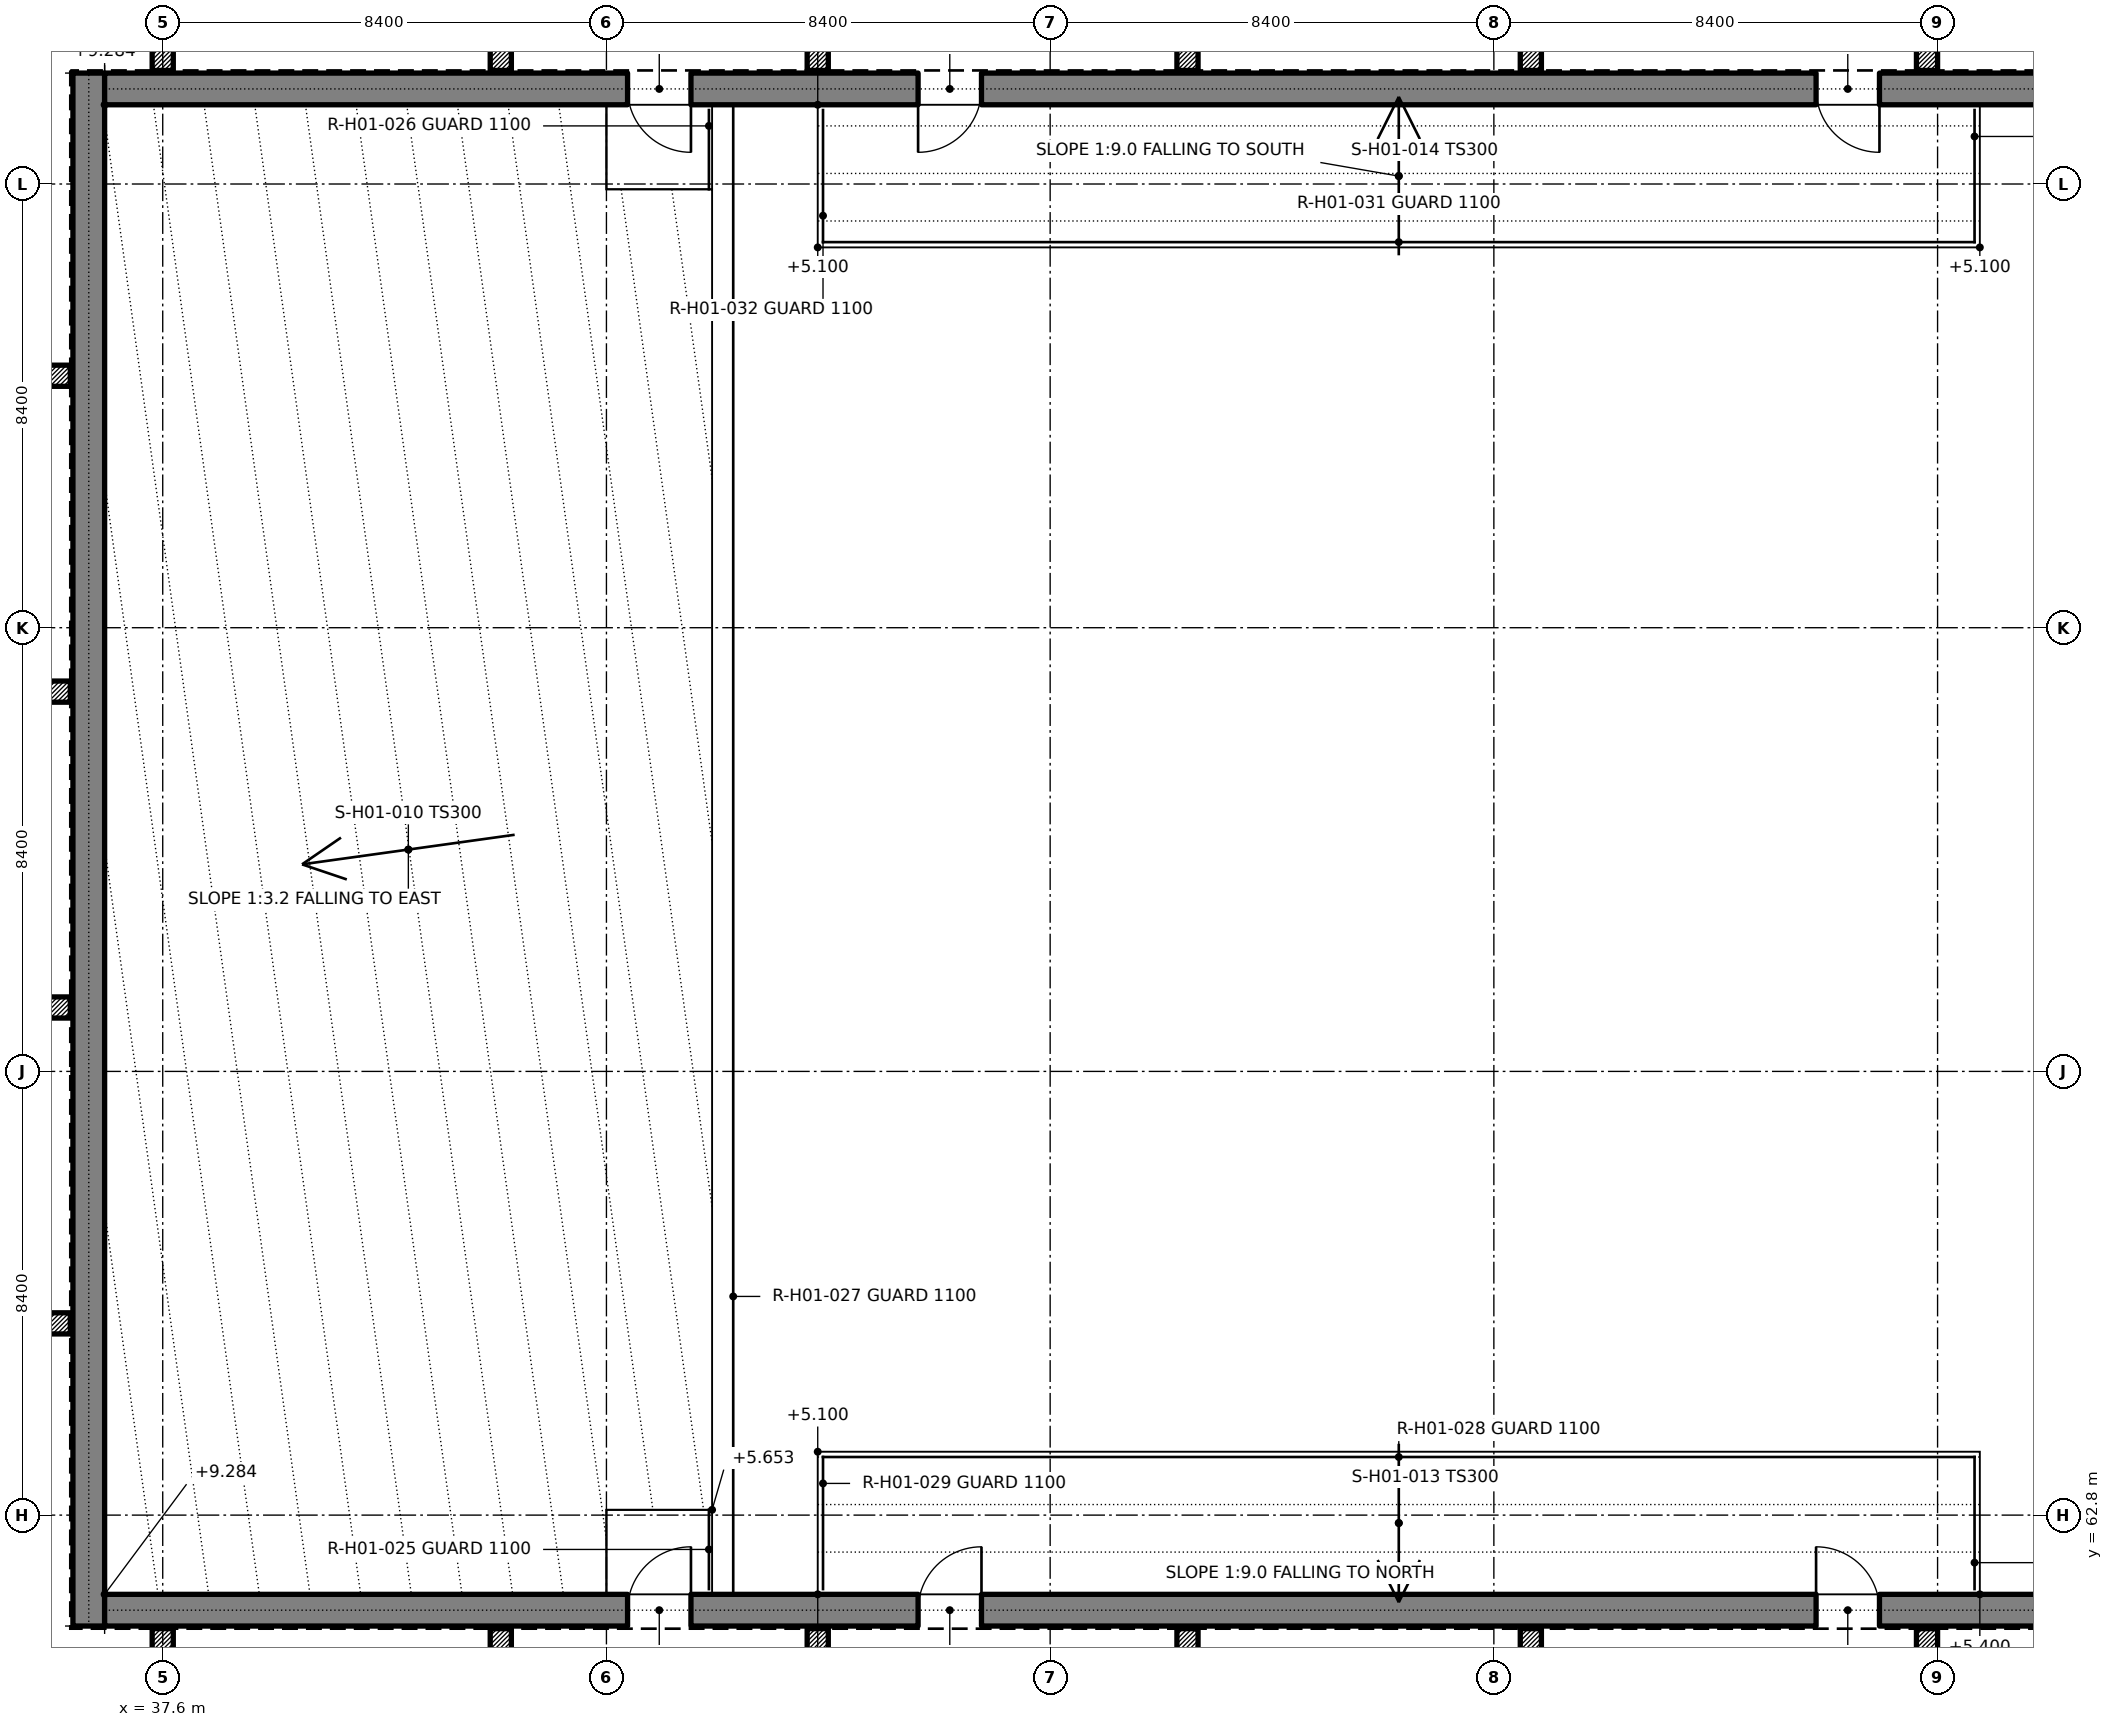
"""IFC4 building model, lengths in metres.
Left out: names, types, materials, properties, quantities, classifications, styles, units other than length and angle.
Written with IfcOpenShell. Run it as: python <this file> out.ifc"""

import sys

from ifc_helpers import new_model, si_unit, direction, frame, frame_2d, origin, origin_2d, place, context, subcontext, project, spatial, rectangle, extrude, element, fill, save


model = new_model("IFC4")
c1 = context("Model", 3, precision=1e-05, world=origin(), true_north=direction((0.0, 1.0)))
c2 = subcontext(c1, "Body", "Model", "MODEL_VIEW")
j1 = project(units=[si_unit("LENGTHUNIT", "METRE"), si_unit("PLANEANGLEUNIT", "RADIAN")], contexts=[c1])
p1 = place(None, origin())
s1 = spatial("IfcSite", under=j1, at=p1, CompositionType="ELEMENT")
p2 = place(p1, origin())
s2 = spatial("IfcBuilding", under=s1, at=p2, CompositionType="ELEMENT")
p3 = place(p2, frame((0.0, 0.0, 5.4)))
s3 = spatial("IfcBuildingStorey", under=s2, at=p3, CompositionType="ELEMENT", Elevation=5.4)
p4 = place(p3, frame((36.2, 60.7, 0.0), z_axis=(0.0, 0.0, 1.0), x_axis=(0.0, 1.0, 0.0)))
e1 = element("IfcWall", 1, at=p4, inside=s3, PredefinedType="SOLIDWALL", context=c2, shape_type="SweptSolid", body=[
    extrude(rectangle(XDim=29.4, YDim=0.6, at=frame_2d((14.7, 0.0))), origin(), (0.0, 0.0, 1.0), 4.8),
])
p5 = place(p3, frame((36.5, 61.0, 0.0), z_axis=(0.0, 0.0, 1.0), x_axis=(1.0, 0.0, 0.0)))
e2 = element("IfcWall", 2, at=p5, inside=s3, PredefinedType="SOLIDWALL", context=c2, shape_type="SweptSolid", body=[
    extrude(rectangle(XDim=52.6, YDim=0.6, at=frame_2d((26.3, 0.0))), origin(), (0.0, 0.0, 1.0), 4.8),
])
p6 = place(p5, frame((9.9, 0.0, 0.0)))
e3 = element("IfcOpeningElement", 3, at=p6, cuts=e2, PredefinedType="OPENING", context=c2, shape_type="SweptSolid", body=[
    extrude(rectangle(XDim=1.2, YDim=2.1, at=frame_2d((0.6, 1.05))), frame((0.0, 0.31, 0.0), z_axis=(0.0, -1.0, 0.0), x_axis=(1.0, 0.0, 0.0)), (0.0, 0.0, 1.0), 0.62),
])
p7 = place(p5, frame((15.4, 0.0, 0.0)))
e4 = element("IfcOpeningElement", 4, at=p7, cuts=e2, PredefinedType="OPENING", context=c2, shape_type="SweptSolid", body=[
    extrude(rectangle(XDim=1.2, YDim=2.1, at=frame_2d((0.6, 1.05))), frame((0.0, 0.31, 0.0), z_axis=(0.0, -1.0, 0.0), x_axis=(1.0, 0.0, 0.0)), (0.0, 0.0, 1.0), 0.62),
])
p8 = place(p5, frame((32.4, 0.0, 0.0)))
e5 = element("IfcOpeningElement", 5, at=p8, cuts=e2, PredefinedType="OPENING", context=c2, shape_type="SweptSolid", body=[
    extrude(rectangle(XDim=1.2, YDim=2.1, at=frame_2d((0.6, 1.05))), frame((0.0, 0.31, 0.0), z_axis=(0.0, -1.0, 0.0), x_axis=(1.0, 0.0, 0.0)), (0.0, 0.0, 1.0), 0.62),
])
p9 = place(p3, frame((36.5, 89.8, 0.0), z_axis=(0.0, 0.0, 1.0), x_axis=(1.0, 0.0, 0.0)))
e6 = element("IfcWall", 6, at=p9, inside=s3, PredefinedType="SOLIDWALL", context=c2, shape_type="SweptSolid", body=[
    extrude(rectangle(XDim=52.6, YDim=0.6, at=frame_2d((26.3, 0.0))), origin(), (0.0, 0.0, 1.0), 4.8),
])
p10 = place(p9, frame((9.9, 0.0, 0.0)))
e7 = element("IfcOpeningElement", 7, at=p10, cuts=e6, PredefinedType="OPENING", context=c2, shape_type="SweptSolid", body=[
    extrude(rectangle(XDim=1.2, YDim=2.1, at=frame_2d((0.6, 1.05))), frame((0.0, 0.31, 0.0), z_axis=(0.0, -1.0, 0.0), x_axis=(1.0, 0.0, 0.0)), (0.0, 0.0, 1.0), 0.62),
])
p11 = place(p9, frame((15.4, 0.0, 0.0)))
e8 = element("IfcOpeningElement", 8, at=p11, cuts=e6, PredefinedType="OPENING", context=c2, shape_type="SweptSolid", body=[
    extrude(rectangle(XDim=1.2, YDim=2.1, at=frame_2d((0.6, 1.05))), frame((0.0, 0.31, 0.0), z_axis=(0.0, -1.0, 0.0), x_axis=(1.0, 0.0, 0.0)), (0.0, 0.0, 1.0), 0.62),
])
p12 = place(p9, frame((32.4, 0.0, 0.0)))
e9 = element("IfcOpeningElement", 9, at=p12, cuts=e6, PredefinedType="OPENING", context=c2, shape_type="SweptSolid", body=[
    extrude(rectangle(XDim=1.2, YDim=2.1, at=frame_2d((0.6, 1.05))), frame((0.0, 0.31, 0.0), z_axis=(0.0, -1.0, 0.0), x_axis=(1.0, 0.0, 0.0)), (0.0, 0.0, 1.0), 0.62),
])
for number, where, z_axis, x_axis in (
    (10, (37.6, 60.45, 0.0), (0.0, 0.0, 1.0), (1.0, 0.0, 0.0)),
    (11, (44.0, 60.45, 0.0), (0.0, 0.0, 1.0), (1.0, 0.0, 0.0)),
    (12, (50.0, 60.45, 0.0), (0.0, 0.0, 1.0), (1.0, 0.0, 0.0)),
    (13, (57.0, 60.45, 0.0), (0.0, 0.0, 1.0), (1.0, 0.0, 0.0)),
    (14, (63.5, 60.45, 0.0), (0.0, 0.0, 1.0), (1.0, 0.0, 0.0)),
    (15, (71.0, 60.45, 0.0), (0.0, 0.0, 1.0), (1.0, 0.0, 0.0)),
    (16, (37.6, 90.35, 0.0), (0.0, 0.0, 1.0), (1.0, 0.0, 0.0)),
    (17, (44.0, 90.35, 0.0), (0.0, 0.0, 1.0), (1.0, 0.0, 0.0)),
    (18, (50.0, 90.35, 0.0), (0.0, 0.0, 1.0), (1.0, 0.0, 0.0)),
    (19, (57.0, 90.35, 0.0), (0.0, 0.0, 1.0), (1.0, 0.0, 0.0)),
    (20, (63.5, 90.35, 0.0), (0.0, 0.0, 1.0), (1.0, 0.0, 0.0)),
    (21, (71.0, 90.35, 0.0), (0.0, 0.0, 1.0), (1.0, 0.0, 0.0)),
    (22, (35.65, 66.43, 0.0), (0.0, 0.0, 1.0), (1.0, 0.0, 0.0)),
    (23, (35.65, 72.41, 0.0), (0.0, 0.0, 1.0), (1.0, 0.0, 0.0)),
    (24, (35.65, 78.39, 0.0), (0.0, 0.0, 1.0), (1.0, 0.0, 0.0)),
    (25, (35.65, 84.37, 0.0), (0.0, 0.0, 1.0), (1.0, 0.0, 0.0)),
):
    element("IfcColumn", number, at=place(p3, frame(where, z_axis=z_axis, x_axis=x_axis)), inside=s3, PredefinedType="COLUMN", context=c2, shape_type="SweptSolid", body=[
        extrude(rectangle(XDim=0.4, YDim=0.4, at=origin_2d()), origin(), (0.0, 0.0, 1.0), 4.8),
    ])
p13 = place(p6, origin())
e26 = element("IfcDoor", 26, at=p13, inside=s3, OperationType="SINGLE_SWING_RIGHT", PredefinedType="DOOR", context=c2, shape_type="SweptSolid", body=[
    extrude(rectangle(XDim=1.2, YDim=2.1, at=frame_2d((0.6, 1.05))), frame((0.0, 0.025, 0.0), z_axis=(0.0, -1.0, 0.0), x_axis=(1.0, 0.0, 0.0)), (0.0, 0.0, 1.0), 0.05),
])
fill(e3, e26)
p14 = place(p7, origin())
e27 = element("IfcDoor", 27, at=p14, inside=s3, OperationType="SINGLE_SWING_RIGHT", PredefinedType="DOOR", context=c2, shape_type="SweptSolid", body=[
    extrude(rectangle(XDim=1.2, YDim=2.1, at=frame_2d((0.6, 1.05))), frame((0.0, 0.025, 0.0), z_axis=(0.0, -1.0, 0.0), x_axis=(1.0, 0.0, 0.0)), (0.0, 0.0, 1.0), 0.05),
])
fill(e4, e27)
p15 = place(p8, origin())
e28 = element("IfcDoor", 28, at=p15, inside=s3, OperationType="SINGLE_SWING_LEFT", PredefinedType="DOOR", context=c2, shape_type="SweptSolid", body=[
    extrude(rectangle(XDim=1.2, YDim=2.1, at=frame_2d((0.6, 1.05))), frame((0.0, 0.025, 0.0), z_axis=(0.0, -1.0, 0.0), x_axis=(1.0, 0.0, 0.0)), (0.0, 0.0, 1.0), 0.05),
])
fill(e5, e28)
p16 = place(p10, frame((1.2, 0.0, 0.0), z_axis=(0.0, 0.0, 1.0), x_axis=(-1.0, 0.0, 0.0)))
e29 = element("IfcDoor", 29, at=p16, inside=s3, OperationType="SINGLE_SWING_LEFT", PredefinedType="DOOR", context=c2, shape_type="SweptSolid", body=[
    extrude(rectangle(XDim=1.2, YDim=2.1, at=frame_2d((0.6, 1.05))), frame((0.0, 0.025, 0.0), z_axis=(0.0, -1.0, 0.0), x_axis=(1.0, 0.0, 0.0)), (0.0, 0.0, 1.0), 0.05),
])
fill(e7, e29)
p17 = place(p11, frame((1.2, 0.0, 0.0), z_axis=(0.0, 0.0, 1.0), x_axis=(-1.0, 0.0, 0.0)))
e30 = element("IfcDoor", 30, at=p17, inside=s3, OperationType="SINGLE_SWING_RIGHT", PredefinedType="DOOR", context=c2, shape_type="SweptSolid", body=[
    extrude(rectangle(XDim=1.2, YDim=2.1, at=frame_2d((0.6, 1.05))), frame((0.0, 0.025, 0.0), z_axis=(0.0, -1.0, 0.0), x_axis=(1.0, 0.0, 0.0)), (0.0, 0.0, 1.0), 0.05),
])
fill(e8, e30)
p18 = place(p12, frame((1.2, 0.0, 0.0), z_axis=(0.0, 0.0, 1.0), x_axis=(-1.0, 0.0, 0.0)))
e31 = element("IfcDoor", 31, at=p18, inside=s3, OperationType="SINGLE_SWING_LEFT", PredefinedType="DOOR", context=c2, shape_type="SweptSolid", body=[
    extrude(rectangle(XDim=1.2, YDim=2.1, at=frame_2d((0.6, 1.05))), frame((0.0, 0.025, 0.0), z_axis=(0.0, -1.0, 0.0), x_axis=(1.0, 0.0, 0.0)), (0.0, 0.0, 1.0), 0.05),
])
fill(e9, e31)
save(model, sys.argv[1])
